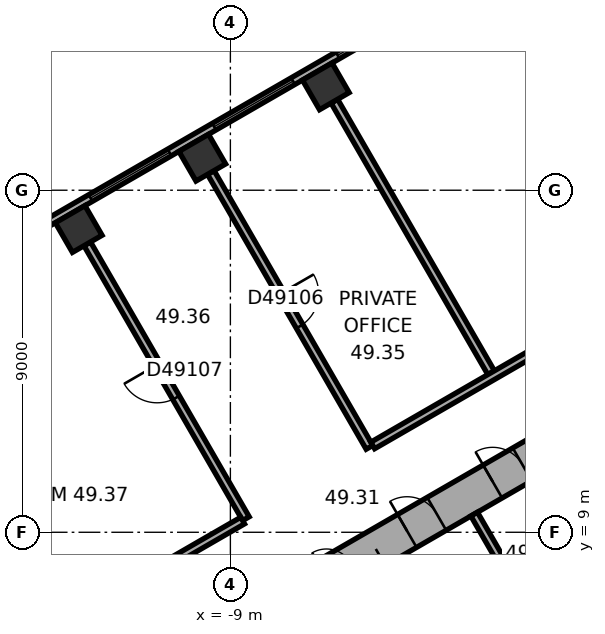
"""IFC4 building model, lengths in metres.
Left out: names, types, materials, properties, quantities, classifications, styles, units other than length and angle.
Written with IfcOpenShell. Run it as: python <this file> out.ifc"""

import sys

from ifc_helpers import new_model, si_unit, direction, frame, frame_2d, origin, origin_2d, place, context, subcontext, project, spatial, rectangle, extrude, element, fill, save


model = new_model("IFC4")
c1 = context("Model", 3, precision=1e-05, world=origin(), true_north=direction((0.0, 1.0)))
c2 = subcontext(c1, "Body", "Model", "MODEL_VIEW")
j1 = project(units=[si_unit("LENGTHUNIT", "METRE"), si_unit("PLANEANGLEUNIT", "RADIAN")], contexts=[c1])
p1 = place(None, origin())
s1 = spatial("IfcSite", under=j1, at=p1, CompositionType="ELEMENT")
p2 = place(p1, origin())
s2 = spatial("IfcBuilding", under=s1, at=p2, CompositionType="ELEMENT")
p3 = place(p2, frame((0.0, 0.0, 198.4)))
s3 = spatial("IfcBuildingStorey", under=s2, at=p3, CompositionType="ELEMENT", Elevation=198.4)
for number, where, z_axis, x_axis in (
    (1, (-6.489, 20.733, 0.0), (0.0, 0.0, 1.0), (-0.866, -0.5, 0.0)),
    (2, (-9.74, 18.856, 0.0), (0.0, 0.0, 1.0), (-0.866, -0.5, 0.0)),
    (3, (-12.991, 16.979, 0.0), (0.0, 0.0, 1.0), (-0.866, -0.5, 0.0)),
):
    element("IfcColumn", number, at=place(p3, frame(where, z_axis=z_axis, x_axis=x_axis)), inside=s3, PredefinedType="COLUMN", context=c2, shape_type="SweptSolid", body=[
        extrude(rectangle(XDim=0.9, YDim=0.9, at=origin_2d()), origin(), (0.0, 0.0, 1.0), 3.7),
    ])
p4 = place(p3, frame((0.25, 11.691, 0.0), z_axis=(0.0, 0.0, 1.0), x_axis=(-0.866022616891, -0.50000482701, 0.0)))
e4 = element("IfcWall", 4, at=p4, inside=s3, PredefinedType="SHEAR", context=c2, shape_type="SweptSolid", body=[
    extrude(rectangle(XDim=12.125, YDim=1.0, at=frame_2d((6.062, 0.0))), origin(), (0.0, 0.0, 1.0), 3.7),
])
p5 = place(p4, frame((6.262, 0.0, 0.0)))
e5 = element("IfcOpeningElement", 5, at=p5, cuts=e4, PredefinedType="OPENING", context=c2, shape_type="SweptSolid", body=[
    extrude(rectangle(XDim=1.5, YDim=2.1, at=frame_2d((0.75, 1.05))), frame((0.0, 0.51, 0.0), z_axis=(0.0, -1.0, 0.0), x_axis=(1.0, 0.0, 0.0)), (0.0, 0.0, 1.0), 1.02),
])
p6 = place(p4, frame((1.812, 0.0, 0.0)))
e6 = element("IfcOpeningElement", 6, at=p6, cuts=e4, PredefinedType="OPENING", context=c2, shape_type="SweptSolid", body=[
    extrude(rectangle(XDim=0.9, YDim=2.1, at=frame_2d((0.45, 1.05))), frame((0.0, 0.51, 0.0), z_axis=(0.0, -1.0, 0.0), x_axis=(1.0, 0.0, 0.0)), (0.0, 0.0, 1.0), 1.02),
])
p7 = place(p4, frame((4.412, 0.0, 0.0)))
e7 = element("IfcOpeningElement", 7, at=p7, cuts=e4, PredefinedType="OPENING", context=c2, shape_type="SweptSolid", body=[
    extrude(rectangle(XDim=0.9, YDim=2.1, at=frame_2d((0.45, 1.05))), frame((0.0, 0.51, 0.0), z_axis=(0.0, -1.0, 0.0), x_axis=(1.0, 0.0, 0.0)), (0.0, 0.0, 1.0), 1.02),
])
p8 = place(p3, frame((-2.961, 23.405, 0.0), z_axis=(0.0, 0.0, 1.0), x_axis=(-0.866023315909, -0.500003616288, 0.0)))
e8 = element("IfcWall", 8, at=p8, inside=s3, PredefinedType="STANDARD", context=c2, shape_type="SweptSolid", body=[
    extrude(rectangle(XDim=20.044, YDim=0.2, at=frame_2d((10.022, 0.0))), origin(), (0.0, 0.0, 1.0), 3.7),
])
p9 = place(p8, frame((1.314, 0.0, 0.9)))
e9 = element("IfcOpeningElement", 9, at=p9, cuts=e8, PredefinedType="OPENING", context=c2, shape_type="SweptSolid", body=[
    extrude(rectangle(XDim=2.4, YDim=2.0, at=frame_2d((1.2, 1.0))), frame((0.0, 0.11, 0.0), z_axis=(0.0, -1.0, 0.0), x_axis=(1.0, 0.0, 0.0)), (0.0, 0.0, 1.0), 0.22),
])
p10 = place(p8, frame((5.069, 0.0, 0.9)))
e10 = element("IfcOpeningElement", 10, at=p10, cuts=e8, PredefinedType="OPENING", context=c2, shape_type="SweptSolid", body=[
    extrude(rectangle(XDim=2.4, YDim=2.0, at=frame_2d((1.2, 1.0))), frame((0.0, 0.11, 0.0), z_axis=(0.0, -1.0, 0.0), x_axis=(1.0, 0.0, 0.0)), (0.0, 0.0, 1.0), 0.22),
])
p11 = place(p8, frame((8.823, 0.0, 0.9)))
e11 = element("IfcOpeningElement", 11, at=p11, cuts=e8, PredefinedType="OPENING", context=c2, shape_type="SweptSolid", body=[
    extrude(rectangle(XDim=2.4, YDim=2.0, at=frame_2d((1.2, 1.0))), frame((0.0, 0.11, 0.0), z_axis=(0.0, -1.0, 0.0), x_axis=(1.0, 0.0, 0.0)), (0.0, 0.0, 1.0), 0.22),
])
p12 = place(p8, frame((12.577, 0.0, 0.9)))
e12 = element("IfcOpeningElement", 12, at=p12, cuts=e8, PredefinedType="OPENING", context=c2, shape_type="SweptSolid", body=[
    extrude(rectangle(XDim=2.4, YDim=2.0, at=frame_2d((1.2, 1.0))), frame((0.0, 0.11, 0.0), z_axis=(0.0, -1.0, 0.0), x_axis=(1.0, 0.0, 0.0)), (0.0, 0.0, 1.0), 0.22),
])
p13 = place(p8, frame((16.331, 0.0, 0.9)))
e13 = element("IfcOpeningElement", 13, at=p13, cuts=e8, PredefinedType="OPENING", context=c2, shape_type="SweptSolid", body=[
    extrude(rectangle(XDim=2.4, YDim=2.0, at=frame_2d((1.2, 1.0))), frame((0.0, 0.11, 0.0), z_axis=(0.0, -1.0, 0.0), x_axis=(1.0, 0.0, 0.0)), (0.0, 0.0, 1.0), 0.22),
])
p14 = place(p3, frame((0.803, 9.009, 0.0), z_axis=(0.0, 0.0, 1.0), x_axis=(-0.866028230842, -0.499995103361, 0.0)))
e14 = element("IfcWall", 14, at=p14, inside=s3, PredefinedType="PARTITIONING", context=c2, shape_type="SweptSolid", body=[
    extrude(rectangle(XDim=5.4, YDim=0.2, at=frame_2d((2.7, 0.0))), origin(), (0.0, 0.0, 1.0), 3.42),
])
p15 = place(p3, frame((-1.485, 7.572, 0.0), z_axis=(0.0, 0.0, 1.0), x_axis=(-0.50002983664, 0.866008176907, 0.0)))
e15 = element("IfcWall", 15, at=p15, inside=s3, PredefinedType="PARTITIONING", context=c2, shape_type="SweptSolid", body=[
    extrude(rectangle(XDim=2.2, YDim=0.2, at=frame_2d((1.1, 0.0))), origin(), (0.0, 0.0, 1.0), 3.42),
])
p16 = place(p3, frame((-2.216, 4.282, 0.0), z_axis=(0.0, 0.0, 1.0), x_axis=(0.499977259774, 0.866038532462, 0.0)))
e16 = element("IfcWall", 16, at=p16, inside=s3, PredefinedType="SHEAR", context=c2, shape_type="SweptSolid", body=[
    extrude(rectangle(XDim=4.7, YDim=0.3, at=frame_2d((2.35, 0.0))), origin(), (0.0, 0.0, 1.0), 3.42),
])
p17 = place(p3, frame((-12.766, 16.589, 0.0), z_axis=(0.0, 0.0, 1.0), x_axis=(0.500010139422, -0.866019549707, 0.0)))
e17 = element("IfcWall", 17, at=p17, inside=s3, PredefinedType="PARTITIONING", context=c2, shape_type="SweptSolid", body=[
    extrude(rectangle(XDim=8.35, YDim=0.2, at=frame_2d((4.175, 0.0))), origin(), (0.0, 0.0, 1.0), 3.42),
])
p18 = place(p17, frame((3.675, 0.0, 0.0)))
e18 = element("IfcOpeningElement", 18, at=p18, cuts=e17, PredefinedType="OPENING", context=c2, shape_type="SweptSolid", body=[
    extrude(rectangle(XDim=1.0, YDim=2.1, at=frame_2d((0.5, 1.05))), frame((0.0, 0.11, 0.0), z_axis=(0.0, -1.0, 0.0), x_axis=(1.0, 0.0, 0.0)), (0.0, 0.0, 1.0), 0.22),
])
p19 = place(p3, frame((-9.515, 18.466, 0.0), z_axis=(0.0, 0.0, 1.0), x_axis=(0.500010139422, -0.866019549707, 0.0)))
e19 = element("IfcWall", 19, at=p19, inside=s3, PredefinedType="PARTITIONING", context=c2, shape_type="SweptSolid", body=[
    extrude(rectangle(XDim=8.35, YDim=0.2, at=frame_2d((4.175, 0.0))), origin(), (0.0, 0.0, 1.0), 2.87),
])
p20 = place(p19, frame((3.675, 0.0, 0.0)))
e20 = element("IfcOpeningElement", 20, at=p20, cuts=e19, PredefinedType="OPENING", context=c2, shape_type="SweptSolid", body=[
    extrude(rectangle(XDim=1.0, YDim=2.1, at=frame_2d((0.5, 1.05))), frame((0.0, 0.11, 0.0), z_axis=(0.0, -1.0, 0.0), x_axis=(1.0, 0.0, 0.0)), (0.0, 0.0, 1.0), 0.22),
])
p21 = place(p3, frame((-8.678, 9.308, 0.0), z_axis=(0.0, 0.0, 1.0), x_axis=(-0.866000359435, -0.500043375578, 0.0)))
e21 = element("IfcWall", 21, at=p21, inside=s3, PredefinedType="PARTITIONING", context=c2, shape_type="SweptSolid", body=[
    extrude(rectangle(XDim=3.161, YDim=0.2, at=frame_2d((1.581, 0.0))), origin(), (0.0, 0.0, 1.0), 3.42),
])
p22 = place(p3, frame((-6.264, 20.344, 0.0), z_axis=(0.0, 0.0, 1.0), x_axis=(0.499996545922, -0.866027397988, 0.0)))
e22 = element("IfcWall", 22, at=p22, inside=s3, PredefinedType="PARTITIONING", context=c2, shape_type="SweptSolid", body=[
    extrude(rectangle(XDim=8.25, YDim=0.2, at=frame_2d((4.125, 0.0))), origin(), (0.0, 0.0, 1.0), 3.42),
])
p23 = place(p3, frame((-0.95, 13.77, 0.0), z_axis=(0.0, 0.0, 1.0), x_axis=(-0.866036689987, -0.499980451214, 0.0)))
e23 = element("IfcWall", 23, at=p23, inside=s3, PredefinedType="PARTITIONING", context=c2, shape_type="SweptSolid", body=[
    extrude(rectangle(XDim=4.969, YDim=0.2, at=frame_2d((2.485, 0.0))), origin(), (0.0, 0.0, 1.0), 3.42),
])
p24 = place(p9, origin())
e24 = element("IfcWindow", 24, at=p24, inside=s3, PartitioningType="SINGLE_PANEL", PredefinedType="WINDOW", context=c2, shape_type="SweptSolid", body=[
    extrude(rectangle(XDim=2.4, YDim=2.0, at=frame_2d((1.2, 1.0))), frame((0.0, 0.03, 0.0), z_axis=(0.0, -1.0, 0.0), x_axis=(1.0, 0.0, 0.0)), (0.0, 0.0, 1.0), 0.06),
])
fill(e9, e24)
p25 = place(p10, origin())
e25 = element("IfcWindow", 25, at=p25, inside=s3, PartitioningType="SINGLE_PANEL", PredefinedType="WINDOW", context=c2, shape_type="SweptSolid", body=[
    extrude(rectangle(XDim=2.4, YDim=2.0, at=frame_2d((1.2, 1.0))), frame((0.0, 0.03, 0.0), z_axis=(0.0, -1.0, 0.0), x_axis=(1.0, 0.0, 0.0)), (0.0, 0.0, 1.0), 0.06),
])
fill(e10, e25)
p26 = place(p11, origin())
e26 = element("IfcWindow", 26, at=p26, inside=s3, PartitioningType="SINGLE_PANEL", PredefinedType="WINDOW", context=c2, shape_type="SweptSolid", body=[
    extrude(rectangle(XDim=2.4, YDim=2.0, at=frame_2d((1.2, 1.0))), frame((0.0, 0.03, 0.0), z_axis=(0.0, -1.0, 0.0), x_axis=(1.0, 0.0, 0.0)), (0.0, 0.0, 1.0), 0.06),
])
fill(e11, e26)
p27 = place(p5, origin())
e27 = element("IfcDoor", 27, at=p27, inside=s3, OperationType="DOUBLE_DOOR_SINGLE_SWING", PredefinedType="DOOR", context=c2, shape_type="SweptSolid", body=[
    extrude(rectangle(XDim=1.5, YDim=2.1, at=frame_2d((0.75, 1.05))), frame((0.0, 0.025, 0.0), z_axis=(0.0, -1.0, 0.0), x_axis=(1.0, 0.0, 0.0)), (0.0, 0.0, 1.0), 0.05),
])
fill(e5, e27)
p28 = place(p6, origin())
e28 = element("IfcDoor", 28, at=p28, inside=s3, OperationType="SINGLE_SWING_LEFT", PredefinedType="DOOR", context=c2, shape_type="SweptSolid", body=[
    extrude(rectangle(XDim=0.9, YDim=2.1, at=frame_2d((0.45, 1.05))), frame((0.0, 0.025, 0.0), z_axis=(0.0, -1.0, 0.0), x_axis=(1.0, 0.0, 0.0)), (0.0, 0.0, 1.0), 0.05),
])
fill(e6, e28)
p29 = place(p7, origin())
e29 = element("IfcDoor", 29, at=p29, inside=s3, OperationType="SINGLE_SWING_LEFT", PredefinedType="DOOR", context=c2, shape_type="SweptSolid", body=[
    extrude(rectangle(XDim=0.9, YDim=2.1, at=frame_2d((0.45, 1.05))), frame((0.0, 0.025, 0.0), z_axis=(0.0, -1.0, 0.0), x_axis=(1.0, 0.0, 0.0)), (0.0, 0.0, 1.0), 0.05),
])
fill(e7, e29)
p30 = place(p20, origin())
e30 = element("IfcDoor", 30, at=p30, inside=s3, OperationType="SINGLE_SWING_LEFT", PredefinedType="DOOR", context=c2, shape_type="SweptSolid", body=[
    extrude(rectangle(XDim=1.0, YDim=2.1, at=frame_2d((0.5, 1.05))), frame((0.0, 0.025, 0.0), z_axis=(0.0, -1.0, 0.0), x_axis=(1.0, 0.0, 0.0)), (0.0, 0.0, 1.0), 0.05),
])
fill(e20, e30)
p31 = place(p18, origin())
e31 = element("IfcDoor", 31, at=p31, inside=s3, OperationType="SINGLE_SWING_LEFT", PredefinedType="DOOR", context=c2, shape_type="SweptSolid", body=[
    extrude(rectangle(XDim=1.0, YDim=2.1, at=frame_2d((0.5, 1.05))), frame((0.0, 0.025, 0.0), z_axis=(0.0, -1.0, 0.0), x_axis=(1.0, 0.0, 0.0)), (0.0, 0.0, 1.0), 0.05),
])
fill(e18, e31)
save(model, sys.argv[1])
